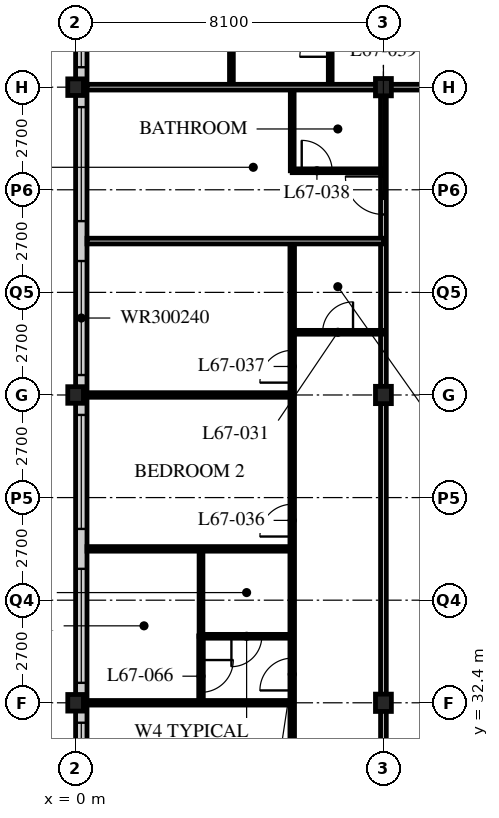
"""IFC4 building model, lengths in metres.
Left out: names, types, materials, properties, quantities, classifications, styles, units other than length and angle.
Written with IfcOpenShell. Run it as: python <this file> out.ifc"""

import sys

from ifc_helpers import new_model, si_unit, direction, frame, frame_2d, origin, origin_2d, place, context, subcontext, project, spatial, rectangle, i_section, extrude, element, fill, save


model = new_model("IFC4")
c1 = context("Model", 3, precision=1e-05, world=origin(), true_north=direction((0.0, 1.0)))
c2 = subcontext(c1, "Body", "Model", "MODEL_VIEW")
j1 = project(units=[si_unit("LENGTHUNIT", "METRE"), si_unit("PLANEANGLEUNIT", "RADIAN")], contexts=[c1])
p1 = place(None, origin())
s1 = spatial("IfcSite", under=j1, at=p1, CompositionType="ELEMENT")
p2 = place(p1, origin())
s2 = spatial("IfcBuilding", under=s1, at=p2, CompositionType="ELEMENT")
p3 = place(p2, frame((0.0, 0.0, 261.9)))
s3 = spatial("IfcBuildingStorey", under=s2, at=p3, CompositionType="ELEMENT", Elevation=261.9)
for number, where, z_axis, x_axis in (
    (1, (0.0, 32.4, 0.0), (0.0, 0.0, 1.0), (1.0, 0.0, 0.0)),
    (2, (0.0, 40.5, 0.0), (0.0, 0.0, 1.0), (1.0, 0.0, 0.0)),
    (3, (0.0, 48.6, 0.0), (0.0, 0.0, 1.0), (1.0, 0.0, 0.0)),
):
    element("IfcColumn", number, at=place(p3, frame(where, z_axis=z_axis, x_axis=x_axis)), inside=s3, PredefinedType="COLUMN", context=c2, shape_type="SweptSolid", body=[
        extrude(i_section(OverallWidth=0.412, OverallDepth=0.437, WebThickness=0.036, FlangeThickness=0.058, FilletRadius=0.015, at=origin_2d()), origin(), (0.0, 0.0, 1.0), 3.9),
    ])
for number, where, z_axis, x_axis in (
    (4, (8.1, 32.4, 0.0), (0.0, 0.0, 1.0), (1.0, 0.0, 0.0)),
    (5, (8.1, 40.5, 0.0), (0.0, 0.0, 1.0), (1.0, 0.0, 0.0)),
    (6, (8.1, 48.6, 0.0), (0.0, 0.0, 1.0), (1.0, 0.0, 0.0)),
):
    element("IfcColumn", number, at=place(p3, frame(where, z_axis=z_axis, x_axis=x_axis)), inside=s3, PredefinedType="COLUMN", context=c2, shape_type="SweptSolid", body=[
        extrude(i_section(OverallWidth=0.418, OverallDepth=0.456, WebThickness=0.042, FlangeThickness=0.067, FilletRadius=0.015, at=origin_2d()), origin(), (0.0, 0.0, 1.0), 3.9),
    ])
p4 = place(p3, frame((0.15, 56.4, 0.0), z_axis=(0.0, 0.0, 1.0), x_axis=(0.0, -1.0, 0.0)))
e7 = element("IfcWall", 7, at=p4, inside=s3, PredefinedType="SOLIDWALL", context=c2, shape_type="SweptSolid", body=[
    extrude(rectangle(XDim=32.1, YDim=0.3, at=frame_2d((16.05, 0.0))), origin(), (0.0, 0.0, 1.0), 3.69),
])
p5 = place(p4, frame((0.225, 0.0, 0.6)))
e8 = element("IfcOpeningElement", 8, at=p5, cuts=e7, PredefinedType="OPENING", context=c2, shape_type="SweptSolid", body=[
    extrude(rectangle(XDim=3.0, YDim=2.4, at=frame_2d((1.5, 1.2))), frame((0.0, 0.16, 0.0), z_axis=(0.0, -1.0, 0.0), x_axis=(1.0, 0.0, 0.0)), (0.0, 0.0, 1.0), 0.32),
])
p6 = place(p4, frame((4.275, 0.0, 0.6)))
e9 = element("IfcOpeningElement", 9, at=p6, cuts=e7, PredefinedType="OPENING", context=c2, shape_type="SweptSolid", body=[
    extrude(rectangle(XDim=3.0, YDim=2.4, at=frame_2d((1.5, 1.2))), frame((0.0, 0.16, 0.0), z_axis=(0.0, -1.0, 0.0), x_axis=(1.0, 0.0, 0.0)), (0.0, 0.0, 1.0), 0.32),
])
p7 = place(p4, frame((8.325, 0.0, 0.6)))
e10 = element("IfcOpeningElement", 10, at=p7, cuts=e7, PredefinedType="OPENING", context=c2, shape_type="SweptSolid", body=[
    extrude(rectangle(XDim=3.0, YDim=2.4, at=frame_2d((1.5, 1.2))), frame((0.0, 0.16, 0.0), z_axis=(0.0, -1.0, 0.0), x_axis=(1.0, 0.0, 0.0)), (0.0, 0.0, 1.0), 0.32),
])
p8 = place(p4, frame((12.375, 0.0, 0.6)))
e11 = element("IfcOpeningElement", 11, at=p8, cuts=e7, PredefinedType="OPENING", context=c2, shape_type="SweptSolid", body=[
    extrude(rectangle(XDim=3.0, YDim=2.4, at=frame_2d((1.5, 1.2))), frame((0.0, 0.16, 0.0), z_axis=(0.0, -1.0, 0.0), x_axis=(1.0, 0.0, 0.0)), (0.0, 0.0, 1.0), 0.32),
])
p9 = place(p4, frame((16.425, 0.0, 0.6)))
e12 = element("IfcOpeningElement", 12, at=p9, cuts=e7, PredefinedType="OPENING", context=c2, shape_type="SweptSolid", body=[
    extrude(rectangle(XDim=3.0, YDim=2.4, at=frame_2d((1.5, 1.2))), frame((0.0, 0.16, 0.0), z_axis=(0.0, -1.0, 0.0), x_axis=(1.0, 0.0, 0.0)), (0.0, 0.0, 1.0), 0.32),
])
p10 = place(p4, frame((20.475, 0.0, 0.6)))
e13 = element("IfcOpeningElement", 13, at=p10, cuts=e7, PredefinedType="OPENING", context=c2, shape_type="SweptSolid", body=[
    extrude(rectangle(XDim=3.0, YDim=2.4, at=frame_2d((1.5, 1.2))), frame((0.0, 0.16, 0.0), z_axis=(0.0, -1.0, 0.0), x_axis=(1.0, 0.0, 0.0)), (0.0, 0.0, 1.0), 0.32),
])
p11 = place(p4, frame((24.525, 0.0, 0.6)))
e14 = element("IfcOpeningElement", 14, at=p11, cuts=e7, PredefinedType="OPENING", context=c2, shape_type="SweptSolid", body=[
    extrude(rectangle(XDim=3.0, YDim=2.4, at=frame_2d((1.5, 1.2))), frame((0.0, 0.16, 0.0), z_axis=(0.0, -1.0, 0.0), x_axis=(1.0, 0.0, 0.0)), (0.0, 0.0, 1.0), 0.32),
])
p12 = place(p4, frame((28.575, 0.0, 0.6)))
e15 = element("IfcOpeningElement", 15, at=p12, cuts=e7, PredefinedType="OPENING", context=c2, shape_type="SweptSolid", body=[
    extrude(rectangle(XDim=3.0, YDim=2.4, at=frame_2d((1.5, 1.2))), frame((0.0, 0.16, 0.0), z_axis=(0.0, -1.0, 0.0), x_axis=(1.0, 0.0, 0.0)), (0.0, 0.0, 1.0), 0.32),
])
p13 = place(p3, frame((8.1, 48.6, 0.0), z_axis=(0.0, 0.0, 1.0), x_axis=(1.0, 0.0, 0.0)))
e16 = element("IfcWall", 16, at=p13, inside=s3, PredefinedType="PARTITIONING", context=c2, shape_type="SweptSolid", body=[
    extrude(rectangle(XDim=28.35, YDim=0.15, at=frame_2d((14.175, 0.0))), origin(), (0.0, 0.0, 1.0), 3.078),
])
p14 = place(p13, frame((4.45, 0.0, 0.0)))
e17 = element("IfcOpeningElement", 17, at=p14, cuts=e16, PredefinedType="OPENING", context=c2, shape_type="SweptSolid", body=[
    extrude(rectangle(XDim=1.0, YDim=2.1, at=frame_2d((0.5, 1.05))), frame((0.0, 0.085, 0.0), z_axis=(0.0, -1.0, 0.0), x_axis=(1.0, 0.0, 0.0)), (0.0, 0.0, 1.0), 0.17),
])
p15 = place(p13, frame((20.65, 0.0, 0.0)))
e18 = element("IfcOpeningElement", 18, at=p15, cuts=e16, PredefinedType="OPENING", context=c2, shape_type="SweptSolid", body=[
    extrude(rectangle(XDim=1.0, YDim=2.1, at=frame_2d((0.5, 1.05))), frame((0.0, 0.085, 0.0), z_axis=(0.0, -1.0, 0.0), x_axis=(1.0, 0.0, 0.0)), (0.0, 0.0, 1.0), 0.17),
])
p16 = place(p13, frame((1.525, 0.0, 0.0)))
e19 = element("IfcOpeningElement", 19, at=p16, cuts=e16, PredefinedType="OPENING", context=c2, shape_type="SweptSolid", body=[
    extrude(rectangle(XDim=1.0, YDim=2.1, at=frame_2d((0.5, 1.05))), frame((0.0, 0.085, 0.0), z_axis=(0.0, -1.0, 0.0), x_axis=(1.0, 0.0, 0.0)), (0.0, 0.0, 1.0), 0.17),
])
p17 = place(p3, frame((8.1, 22.5, 0.0), z_axis=(0.0, 0.0, 1.0), x_axis=(0.0, 1.0, 0.0)))
e20 = element("IfcWall", 20, at=p17, inside=s3, PredefinedType="PARTITIONING", context=c2, shape_type="SweptSolid", body=[
    extrude(rectangle(XDim=26.1, YDim=0.15, at=frame_2d((13.05, 0.0))), origin(), (0.0, 0.0, 1.0), 3.078),
])
p18 = place(p17, frame((2.65, 0.0, 0.0)))
e21 = element("IfcOpeningElement", 21, at=p18, cuts=e20, PredefinedType="OPENING", context=c2, shape_type="SweptSolid", body=[
    extrude(rectangle(XDim=1.0, YDim=2.1, at=frame_2d((0.5, 1.05))), frame((0.0, 0.085, 0.0), z_axis=(0.0, -1.0, 0.0), x_axis=(1.0, 0.0, 0.0)), (0.0, 0.0, 1.0), 0.17),
])
p19 = place(p17, frame((22.75, 0.0, 0.0)))
e22 = element("IfcOpeningElement", 22, at=p19, cuts=e20, PredefinedType="OPENING", context=c2, shape_type="SweptSolid", body=[
    extrude(rectangle(XDim=1.0, YDim=2.1, at=frame_2d((0.5, 1.05))), frame((0.0, 0.085, 0.0), z_axis=(0.0, -1.0, 0.0), x_axis=(1.0, 0.0, 0.0)), (0.0, 0.0, 1.0), 0.17),
])
p20 = place(p3, frame((5.7, 22.5, 0.0), z_axis=(0.0, 0.0, 1.0), x_axis=(0.0, 1.0, 0.0)))
e23 = element("IfcWall", 23, at=p20, inside=s3, PredefinedType="PARTITIONING", context=c2, shape_type="SweptSolid", body=[
    extrude(rectangle(XDim=22.05, YDim=0.12, at=frame_2d((11.025, 0.0))), origin(), (0.0, 0.0, 1.0), 3.69),
])
p21 = place(p20, frame((0.975, 0.0, 0.0)))
e24 = element("IfcOpeningElement", 24, at=p21, cuts=e23, PredefinedType="OPENING", context=c2, shape_type="SweptSolid", body=[
    extrude(rectangle(XDim=0.85, YDim=2.1, at=frame_2d((0.425, 1.05))), frame((0.0, 0.07, 0.0), z_axis=(0.0, -1.0, 0.0), x_axis=(1.0, 0.0, 0.0)), (0.0, 0.0, 1.0), 0.14),
])
p22 = place(p20, frame((10.225, 0.0, 0.0)))
e25 = element("IfcOpeningElement", 25, at=p22, cuts=e23, PredefinedType="OPENING", context=c2, shape_type="SweptSolid", body=[
    extrude(rectangle(XDim=0.85, YDim=2.1, at=frame_2d((0.425, 1.05))), frame((0.0, 0.07, 0.0), z_axis=(0.0, -1.0, 0.0), x_axis=(1.0, 0.0, 0.0)), (0.0, 0.0, 1.0), 0.14),
])
p23 = place(p20, frame((14.275, 0.0, 0.0)))
e26 = element("IfcOpeningElement", 26, at=p23, cuts=e23, PredefinedType="OPENING", context=c2, shape_type="SweptSolid", body=[
    extrude(rectangle(XDim=0.85, YDim=2.1, at=frame_2d((0.425, 1.05))), frame((0.0, 0.07, 0.0), z_axis=(0.0, -1.0, 0.0), x_axis=(1.0, 0.0, 0.0)), (0.0, 0.0, 1.0), 0.14),
])
p24 = place(p20, frame((18.325, 0.0, 0.0)))
e27 = element("IfcOpeningElement", 27, at=p24, cuts=e23, PredefinedType="OPENING", context=c2, shape_type="SweptSolid", body=[
    extrude(rectangle(XDim=0.85, YDim=2.1, at=frame_2d((0.425, 1.05))), frame((0.0, 0.07, 0.0), z_axis=(0.0, -1.0, 0.0), x_axis=(1.0, 0.0, 0.0)), (0.0, 0.0, 1.0), 0.14),
])
p25 = place(p3, frame((8.1, 42.15, 0.0), z_axis=(0.0, 0.0, 1.0), x_axis=(-1.0, 0.0, 0.0)))
e28 = element("IfcWall", 28, at=p25, inside=s3, PredefinedType="PARTITIONING", context=c2, shape_type="SweptSolid", body=[
    extrude(rectangle(XDim=2.4, YDim=0.1, at=frame_2d((1.2, 0.0))), origin(), (0.0, 0.0, 1.0), 3.69),
])
p26 = place(p25, frame((0.8, 0.0, 0.0)))
e29 = element("IfcOpeningElement", 29, at=p26, cuts=e28, PredefinedType="OPENING", context=c2, shape_type="SweptSolid", body=[
    extrude(rectangle(XDim=0.8, YDim=2.1, at=frame_2d((0.4, 1.05))), frame((0.0, 0.06, 0.0), z_axis=(0.0, -1.0, 0.0), x_axis=(1.0, 0.0, 0.0)), (0.0, 0.0, 1.0), 0.12),
])
p27 = place(p3, frame((5.7, 34.15, 0.0), z_axis=(0.0, 0.0, 1.0), x_axis=(-1.0, 0.0, 0.0)))
e30 = element("IfcWall", 30, at=p27, inside=s3, PredefinedType="PARTITIONING", context=c2, shape_type="SweptSolid", body=[
    extrude(rectangle(XDim=2.4, YDim=0.1, at=frame_2d((1.2, 0.0))), origin(), (0.0, 0.0, 1.0), 3.69),
])
p28 = place(p27, frame((0.8, 0.0, 0.0)))
e31 = element("IfcOpeningElement", 31, at=p28, cuts=e30, PredefinedType="OPENING", context=c2, shape_type="SweptSolid", body=[
    extrude(rectangle(XDim=0.8, YDim=2.1, at=frame_2d((0.4, 1.05))), frame((0.0, 0.06, 0.0), z_axis=(0.0, -1.0, 0.0), x_axis=(1.0, 0.0, 0.0)), (0.0, 0.0, 1.0), 0.12),
])
p29 = place(p3, frame((3.3, 34.15, 0.0), z_axis=(0.0, 0.0, 1.0), x_axis=(0.0, 1.0, 0.0)))
e32 = element("IfcWall", 32, at=p29, inside=s3, PredefinedType="PARTITIONING", context=c2, shape_type="SweptSolid", body=[
    extrude(rectangle(XDim=2.3, YDim=0.1, at=frame_2d((1.15, 0.0))), origin(), (0.0, 0.0, 1.0), 3.69),
])
p30 = place(p3, frame((5.7, 32.4, 0.0), z_axis=(0.0, 0.0, 1.0), x_axis=(-1.0, 0.0, 0.0)))
e33 = element("IfcWall", 33, at=p30, inside=s3, PredefinedType="PARTITIONING", context=c2, shape_type="SweptSolid", body=[
    extrude(rectangle(XDim=5.4, YDim=0.12, at=frame_2d((2.7, 0.0))), origin(), (0.0, 0.0, 1.0), 3.078),
])
p31 = place(p3, frame((5.7, 36.45, 0.0), z_axis=(0.0, 0.0, 1.0), x_axis=(-1.0, 0.0, 0.0)))
e34 = element("IfcWall", 34, at=p31, inside=s3, PredefinedType="PARTITIONING", context=c2, shape_type="SweptSolid", body=[
    extrude(rectangle(XDim=5.4, YDim=0.12, at=frame_2d((2.7, 0.0))), origin(), (0.0, 0.0, 1.0), 3.69),
])
p32 = place(p3, frame((5.7, 40.5, 0.0), z_axis=(0.0, 0.0, 1.0), x_axis=(-1.0, 0.0, 0.0)))
e35 = element("IfcWall", 35, at=p32, inside=s3, PredefinedType="PARTITIONING", context=c2, shape_type="SweptSolid", body=[
    extrude(rectangle(XDim=5.4, YDim=0.12, at=frame_2d((2.7, 0.0))), origin(), (0.0, 0.0, 1.0), 3.078),
])
p33 = place(p3, frame((8.1, 44.55, 0.0), z_axis=(0.0, 0.0, 1.0), x_axis=(-1.0, 0.0, 0.0)))
e36 = element("IfcWall", 36, at=p33, inside=s3, PredefinedType="PARTITIONING", context=c2, shape_type="SweptSolid", body=[
    extrude(rectangle(XDim=7.8, YDim=0.15, at=frame_2d((3.9, 0.0))), origin(), (0.0, 0.0, 1.0), 3.69),
])
p34 = place(p3, frame((5.7, 46.4, 0.0), z_axis=(0.0, 0.0, 1.0), x_axis=(0.0, 1.0, 0.0)))
e37 = element("IfcWall", 37, at=p34, inside=s3, PredefinedType="PARTITIONING", context=c2, shape_type="SweptSolid", body=[
    extrude(rectangle(XDim=2.2, YDim=0.1, at=frame_2d((1.1, 0.0))), origin(), (0.0, 0.0, 1.0), 3.69),
])
p35 = place(p3, frame((8.1, 46.4, 0.0), z_axis=(0.0, 0.0, 1.0), x_axis=(-1.0, 0.0, 0.0)))
e38 = element("IfcWall", 38, at=p35, inside=s3, PredefinedType="PARTITIONING", context=c2, shape_type="SweptSolid", body=[
    extrude(rectangle(XDim=2.4, YDim=0.1, at=frame_2d((1.2, 0.0))), origin(), (0.0, 0.0, 1.0), 3.69),
])
p36 = place(p35, frame((1.35, 0.0, 0.0)))
e39 = element("IfcOpeningElement", 39, at=p36, cuts=e38, PredefinedType="OPENING", context=c2, shape_type="SweptSolid", body=[
    extrude(rectangle(XDim=0.8, YDim=2.1, at=frame_2d((0.4, 1.05))), frame((0.0, 0.06, 0.0), z_axis=(0.0, -1.0, 0.0), x_axis=(1.0, 0.0, 0.0)), (0.0, 0.0, 1.0), 0.12),
])
p37 = place(p3, frame((6.7, 48.6, 0.0), z_axis=(0.0, 0.0, 1.0), x_axis=(0.0, 1.0, 0.0)))
e40 = element("IfcWall", 40, at=p37, inside=s3, PredefinedType="PARTITIONING", context=c2, shape_type="SweptSolid", body=[
    extrude(rectangle(XDim=2.4, YDim=0.1, at=frame_2d((1.2, 0.0))), origin(), (0.0, 0.0, 1.0), 3.69),
])
p38 = place(p37, frame((0.8, 0.0, 0.0)))
e41 = element("IfcOpeningElement", 41, at=p38, cuts=e40, PredefinedType="OPENING", context=c2, shape_type="SweptSolid", body=[
    extrude(rectangle(XDim=0.8, YDim=2.1, at=frame_2d((0.4, 1.05))), frame((0.0, 0.06, 0.0), z_axis=(0.0, -1.0, 0.0), x_axis=(1.0, 0.0, 0.0)), (0.0, 0.0, 1.0), 0.12),
])
p39 = place(p3, frame((4.1, 48.6, 0.0), z_axis=(0.0, 0.0, 1.0), x_axis=(0.0, 1.0, 0.0)))
e42 = element("IfcWall", 42, at=p39, inside=s3, PredefinedType="PARTITIONING", context=c2, shape_type="SweptSolid", body=[
    extrude(rectangle(XDim=2.4, YDim=0.1, at=frame_2d((1.2, 0.0))), origin(), (0.0, 0.0, 1.0), 3.69),
])
p40 = place(p3, frame((0.3, 48.6, 0.0), z_axis=(0.0, 0.0, 1.0), x_axis=(1.0, 0.0, 0.0)))
e43 = element("IfcWall", 43, at=p40, inside=s3, PredefinedType="PARTITIONING", context=c2, shape_type="SweptSolid", body=[
    extrude(rectangle(XDim=7.8, YDim=0.15, at=frame_2d((3.9, 0.0))), origin(), (0.0, 0.0, 1.0), 3.078),
])
p41 = place(p3, frame((3.3, 32.4, 0.0), z_axis=(0.0, 0.0, 1.0), x_axis=(0.0, 1.0, 0.0)))
e44 = element("IfcWall", 44, at=p41, inside=s3, PredefinedType="PARTITIONING", context=c2, shape_type="SweptSolid", body=[
    extrude(rectangle(XDim=1.76, YDim=0.12, at=frame_2d((0.88, 0.0))), origin(), (0.0, 0.0, 1.0), 3.69),
])
p42 = place(p41, frame((0.275, 0.0, 0.0)))
e45 = element("IfcOpeningElement", 45, at=p42, cuts=e44, PredefinedType="OPENING", context=c2, shape_type="SweptSolid", body=[
    extrude(rectangle(XDim=0.85, YDim=2.1, at=frame_2d((0.425, 1.05))), frame((0.0, 0.07, 0.0), z_axis=(0.0, -1.0, 0.0), x_axis=(1.0, 0.0, 0.0)), (0.0, 0.0, 1.0), 0.14),
])
p43 = place(p6, origin())
e46 = element("IfcWindow", 46, at=p43, inside=s3, PartitioningType="SINGLE_PANEL", PredefinedType="WINDOW", context=c2, shape_type="SweptSolid", body=[
    extrude(rectangle(XDim=3.0, YDim=2.4, at=frame_2d((1.5, 1.2))), frame((0.0, 0.03, 0.0), z_axis=(0.0, -1.0, 0.0), x_axis=(1.0, 0.0, 0.0)), (0.0, 0.0, 1.0), 0.06),
])
fill(e9, e46)
p44 = place(p7, origin())
e47 = element("IfcWindow", 47, at=p44, inside=s3, PartitioningType="SINGLE_PANEL", PredefinedType="WINDOW", context=c2, shape_type="SweptSolid", body=[
    extrude(rectangle(XDim=3.0, YDim=2.4, at=frame_2d((1.5, 1.2))), frame((0.0, 0.03, 0.0), z_axis=(0.0, -1.0, 0.0), x_axis=(1.0, 0.0, 0.0)), (0.0, 0.0, 1.0), 0.06),
])
fill(e10, e47)
p45 = place(p8, origin())
e48 = element("IfcWindow", 48, at=p45, inside=s3, PartitioningType="SINGLE_PANEL", PredefinedType="WINDOW", context=c2, shape_type="SweptSolid", body=[
    extrude(rectangle(XDim=3.0, YDim=2.4, at=frame_2d((1.5, 1.2))), frame((0.0, 0.03, 0.0), z_axis=(0.0, -1.0, 0.0), x_axis=(1.0, 0.0, 0.0)), (0.0, 0.0, 1.0), 0.06),
])
fill(e11, e48)
p46 = place(p9, origin())
e49 = element("IfcWindow", 49, at=p46, inside=s3, PartitioningType="SINGLE_PANEL", PredefinedType="WINDOW", context=c2, shape_type="SweptSolid", body=[
    extrude(rectangle(XDim=3.0, YDim=2.4, at=frame_2d((1.5, 1.2))), frame((0.0, 0.03, 0.0), z_axis=(0.0, -1.0, 0.0), x_axis=(1.0, 0.0, 0.0)), (0.0, 0.0, 1.0), 0.06),
])
fill(e12, e49)
p47 = place(p10, origin())
e50 = element("IfcWindow", 50, at=p47, inside=s3, PartitioningType="SINGLE_PANEL", PredefinedType="WINDOW", context=c2, shape_type="SweptSolid", body=[
    extrude(rectangle(XDim=3.0, YDim=2.4, at=frame_2d((1.5, 1.2))), frame((0.0, 0.03, 0.0), z_axis=(0.0, -1.0, 0.0), x_axis=(1.0, 0.0, 0.0)), (0.0, 0.0, 1.0), 0.06),
])
fill(e13, e50)
p48 = place(p11, origin())
e51 = element("IfcWindow", 51, at=p48, inside=s3, PartitioningType="SINGLE_PANEL", PredefinedType="WINDOW", context=c2, shape_type="SweptSolid", body=[
    extrude(rectangle(XDim=3.0, YDim=2.4, at=frame_2d((1.5, 1.2))), frame((0.0, 0.03, 0.0), z_axis=(0.0, -1.0, 0.0), x_axis=(1.0, 0.0, 0.0)), (0.0, 0.0, 1.0), 0.06),
])
fill(e14, e51)
p49 = place(p26, origin())
e52 = element("IfcDoor", 52, at=p49, inside=s3, OperationType="SINGLE_SWING_RIGHT", PredefinedType="DOOR", context=c2, shape_type="SweptSolid", body=[
    extrude(rectangle(XDim=0.8, YDim=2.1, at=frame_2d((0.4, 1.05))), frame((0.0, 0.025, 0.0), z_axis=(0.0, -1.0, 0.0), x_axis=(1.0, 0.0, 0.0)), (0.0, 0.0, 1.0), 0.05),
])
fill(e29, e52)
p50 = place(p28, origin())
e53 = element("IfcDoor", 53, at=p50, inside=s3, OperationType="SINGLE_SWING_RIGHT", PredefinedType="DOOR", context=c2, shape_type="SweptSolid", body=[
    extrude(rectangle(XDim=0.8, YDim=2.1, at=frame_2d((0.4, 1.05))), frame((0.0, 0.025, 0.0), z_axis=(0.0, -1.0, 0.0), x_axis=(1.0, 0.0, 0.0)), (0.0, 0.0, 1.0), 0.05),
])
fill(e31, e53)
p51 = place(p22, origin())
e54 = element("IfcDoor", 54, at=p51, inside=s3, OperationType="SINGLE_SWING_LEFT", PredefinedType="DOOR", context=c2, shape_type="SweptSolid", body=[
    extrude(rectangle(XDim=0.85, YDim=2.1, at=frame_2d((0.425, 1.05))), frame((0.0, 0.025, 0.0), z_axis=(0.0, -1.0, 0.0), x_axis=(1.0, 0.0, 0.0)), (0.0, 0.0, 1.0), 0.05),
])
fill(e25, e54)
p52 = place(p23, origin())
e55 = element("IfcDoor", 55, at=p52, inside=s3, OperationType="SINGLE_SWING_LEFT", PredefinedType="DOOR", context=c2, shape_type="SweptSolid", body=[
    extrude(rectangle(XDim=0.85, YDim=2.1, at=frame_2d((0.425, 1.05))), frame((0.0, 0.025, 0.0), z_axis=(0.0, -1.0, 0.0), x_axis=(1.0, 0.0, 0.0)), (0.0, 0.0, 1.0), 0.05),
])
fill(e26, e55)
p53 = place(p24, origin())
e56 = element("IfcDoor", 56, at=p53, inside=s3, OperationType="SINGLE_SWING_LEFT", PredefinedType="DOOR", context=c2, shape_type="SweptSolid", body=[
    extrude(rectangle(XDim=0.85, YDim=2.1, at=frame_2d((0.425, 1.05))), frame((0.0, 0.025, 0.0), z_axis=(0.0, -1.0, 0.0), x_axis=(1.0, 0.0, 0.0)), (0.0, 0.0, 1.0), 0.05),
])
fill(e27, e56)
p54 = place(p36, origin())
e57 = element("IfcDoor", 57, at=p54, inside=s3, OperationType="SINGLE_SWING_LEFT", PredefinedType="DOOR", context=c2, shape_type="SweptSolid", body=[
    extrude(rectangle(XDim=0.8, YDim=2.1, at=frame_2d((0.4, 1.05))), frame((0.0, 0.025, 0.0), z_axis=(0.0, -1.0, 0.0), x_axis=(1.0, 0.0, 0.0)), (0.0, 0.0, 1.0), 0.05),
])
fill(e39, e57)
p55 = place(p19, origin())
e58 = element("IfcDoor", 58, at=p55, inside=s3, OperationType="SINGLE_SWING_RIGHT", PredefinedType="DOOR", context=c2, shape_type="SweptSolid", body=[
    extrude(rectangle(XDim=1.0, YDim=2.1, at=frame_2d((0.5, 1.05))), frame((0.0, 0.025, 0.0), z_axis=(0.0, -1.0, 0.0), x_axis=(1.0, 0.0, 0.0)), (0.0, 0.0, 1.0), 0.05),
])
fill(e22, e58)
p56 = place(p38, origin())
e59 = element("IfcDoor", 59, at=p56, inside=s3, OperationType="SINGLE_SWING_LEFT", PredefinedType="DOOR", context=c2, shape_type="SweptSolid", body=[
    extrude(rectangle(XDim=0.8, YDim=2.1, at=frame_2d((0.4, 1.05))), frame((0.0, 0.025, 0.0), z_axis=(0.0, -1.0, 0.0), x_axis=(1.0, 0.0, 0.0)), (0.0, 0.0, 1.0), 0.05),
])
fill(e41, e59)
p57 = place(p42, origin())
e60 = element("IfcDoor", 60, at=p57, inside=s3, OperationType="SINGLE_SWING_LEFT", PredefinedType="DOOR", context=c2, shape_type="SweptSolid", body=[
    extrude(rectangle(XDim=0.85, YDim=2.1, at=frame_2d((0.425, 1.05))), frame((0.0, 0.025, 0.0), z_axis=(0.0, -1.0, 0.0), x_axis=(1.0, 0.0, 0.0)), (0.0, 0.0, 1.0), 0.05),
])
fill(e45, e60)
save(model, sys.argv[1])
